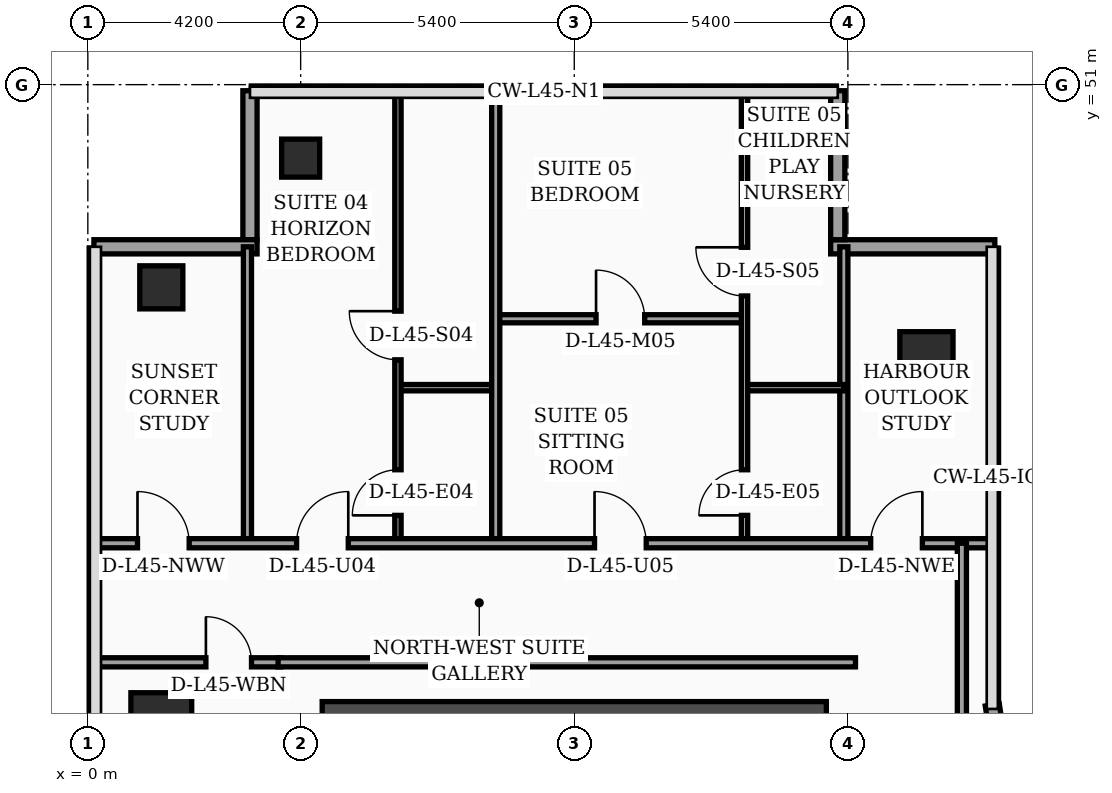
"""IFC4 building model, lengths in metres.
Left out: names, types, materials, properties, quantities, classifications, styles, units other than length and angle.
Written with IfcOpenShell. Run it as: python <this file> out.ifc"""

import sys

from ifc_helpers import new_model, si_unit, direction, frame, frame_2d, origin, origin_2d, place, context, subcontext, project, spatial, rectangle, hollow_rectangle, extrude, element, fill, save


model = new_model("IFC4")
c1 = context("Model", 3, precision=1e-05, world=origin(), true_north=direction((0.0, 1.0)))
c2 = subcontext(c1, "Body", "Model", "MODEL_VIEW")
j1 = project(units=[si_unit("LENGTHUNIT", "METRE"), si_unit("PLANEANGLEUNIT", "RADIAN")], contexts=[c1])
p1 = place(None, origin())
s1 = spatial("IfcSite", under=j1, at=p1, CompositionType="ELEMENT")
p2 = place(p1, origin())
s2 = spatial("IfcBuilding", under=s1, at=p2, CompositionType="ELEMENT")
p3 = place(p2, frame((0.0, 0.0, 182.7)))
s3 = spatial("IfcBuildingStorey", under=s2, at=p3, CompositionType="ELEMENT", Elevation=182.7)
p4 = place(p3, frame((4.625, 38.4, 0.0), z_axis=(0.0, 0.0, 1.0), x_axis=(1.0, 0.0, 0.0)))
e1 = element("IfcWall", 1, at=p4, inside=s3, PredefinedType="SHEAR", context=c2, shape_type="SweptSolid", body=[
    extrude(rectangle(XDim=9.95, YDim=0.85, at=frame_2d((4.975, 0.0))), origin(), (0.0, 0.0, 1.0), 3.52),
])
p5 = place(p3, frame((1.45, 38.4, 0.0), z_axis=(0.0, 0.0, 1.0), x_axis=(1.0, 0.0, 0.0)))
e2 = element("IfcColumn", 2, at=p5, inside=s3, PredefinedType="COLUMN", context=c2, shape_type="SweptSolid", body=[
    extrude(rectangle(XDim=1.2, YDim=1.2, at=origin_2d()), origin(), (0.0, 0.0, 1.0), 3.52),
])
p6 = place(p3, frame((1.45, 47.0, 0.0), z_axis=(0.0, 0.0, 1.0), x_axis=(1.0, 0.0, 0.0)))
e3 = element("IfcColumn", 3, at=p6, inside=s3, PredefinedType="COLUMN", context=c2, shape_type="SweptSolid", body=[
    extrude(hollow_rectangle(XDim=0.85, YDim=0.85, WallThickness=0.036, at=origin_2d()), origin(), (0.0, 0.0, 1.0), 3.52),
])
p7 = place(p3, frame((4.2, 49.55, 0.0), z_axis=(0.0, 0.0, 1.0), x_axis=(1.0, 0.0, 0.0)))
e4 = element("IfcColumn", 4, at=p7, inside=s3, PredefinedType="COLUMN", context=c2, shape_type="SweptSolid", body=[
    extrude(hollow_rectangle(XDim=0.75, YDim=0.75, WallThickness=0.032, at=origin_2d()), origin(), (0.0, 0.0, 1.0), 3.52),
])
p8 = place(p3, frame((16.55, 45.6, 0.0), z_axis=(0.0, 0.0, 1.0), x_axis=(1.0, 0.0, 0.0)))
e5 = element("IfcColumn", 5, at=p8, inside=s3, PredefinedType="COLUMN", context=c2, shape_type="SweptSolid", body=[
    extrude(rectangle(XDim=1.05, YDim=1.05, at=origin_2d()), origin(), (0.0, 0.0, 1.0), 3.52),
])
p9 = place(p3, frame((17.962, 38.03, 0.0), z_axis=(0.0, 0.0, 1.0), x_axis=(-0.15141125477, 0.988470855377, 0.0)))
e6 = element("IfcWall", 6, at=p9, inside=s3, PredefinedType="SOLIDWALL", context=c2, shape_type="SweptSolid", body=[
    extrude(rectangle(XDim=0.739, YDim=0.28, at=frame_2d((0.369, 0.0))), origin(), (0.0, 0.0, 1.0), 3.52),
])
p10 = place(p3, frame((17.9, 47.8, 0.0), z_axis=(0.0, 0.0, 1.0), x_axis=(-1.0, 0.0, 0.0)))
e7 = element("IfcWall", 7, at=p10, inside=s3, PredefinedType="SOLIDWALL", context=c2, shape_type="SweptSolid", body=[
    extrude(rectangle(XDim=3.24, YDim=0.28, at=frame_2d((1.62, 0.0))), origin(), (0.0, 0.0, 1.0), 3.52),
])
p11 = place(p3, frame((14.8, 47.94, 0.0), z_axis=(0.0, 0.0, 1.0), x_axis=(0.0, 1.0, 0.0)))
e8 = element("IfcWall", 8, at=p11, inside=s3, PredefinedType="SOLIDWALL", context=c2, shape_type="SweptSolid", body=[
    extrude(rectangle(XDim=2.94, YDim=0.28, at=frame_2d((1.47, 0.0))), origin(), (0.0, 0.0, 1.0), 3.52),
])
p12 = place(p3, frame((3.2, 50.88, 0.0), z_axis=(0.0, 0.0, 1.0), x_axis=(0.0, -1.0, 0.0)))
e9 = element("IfcWall", 9, at=p12, inside=s3, PredefinedType="SOLIDWALL", context=c2, shape_type="SweptSolid", body=[
    extrude(rectangle(XDim=2.94, YDim=0.28, at=frame_2d((1.47, 0.0))), origin(), (0.0, 0.0, 1.0), 3.02),
])
p13 = place(p3, frame((3.34, 47.8, 0.0), z_axis=(0.0, 0.0, 1.0), x_axis=(-1.0, 0.0, 0.0)))
e10 = element("IfcWall", 10, at=p13, inside=s3, PredefinedType="SOLIDWALL", context=c2, shape_type="SweptSolid", body=[
    extrude(rectangle(XDim=3.22, YDim=0.28, at=frame_2d((1.61, 0.0))), origin(), (0.0, 0.0, 1.0), 3.02),
])
p14 = place(p3, frame((0.08, 39.6, 0.0), z_axis=(0.0, 0.0, 1.0), x_axis=(1.0, 0.0, 0.0)))
e11 = element("IfcWall", 11, at=p14, inside=s3, PredefinedType="PARTITIONING", context=c2, shape_type="SweptSolid", body=[
    extrude(rectangle(XDim=3.725, YDim=0.18, at=frame_2d((1.862, 0.0))), origin(), (0.0, 0.0, 1.0), 2.92),
])
p15 = place(p14, frame((2.25, 0.0, 0.0)))
e12 = element("IfcOpeningElement", 12, at=p15, cuts=e11, PredefinedType="OPENING", context=c2, shape_type="SweptSolid", body=[
    extrude(rectangle(XDim=0.9, YDim=2.15, at=frame_2d((0.45, 1.075))), frame((0.0, 0.1, 0.0), z_axis=(0.0, -1.0, 0.0), x_axis=(1.0, 0.0, 0.0)), (0.0, 0.0, 1.0), 0.2),
])
p16 = place(p3, frame((3.15, 41.95, 0.0), z_axis=(0.0, 0.0, 1.0), x_axis=(0.0, 1.0, 0.0)))
e13 = element("IfcWall", 13, at=p16, inside=s3, PredefinedType="PARTITIONING", context=c2, shape_type="SweptSolid", body=[
    extrude(rectangle(XDim=5.85, YDim=0.16, at=frame_2d((2.925, 0.0))), origin(), (0.0, 0.0, 1.0), 3.12),
])
p17 = place(p3, frame((14.92, 41.95, 0.0), z_axis=(0.0, 0.0, 1.0), x_axis=(0.0, 1.0, 0.0)))
e14 = element("IfcWall", 14, at=p17, inside=s3, PredefinedType="PARTITIONING", context=c2, shape_type="SweptSolid", body=[
    extrude(rectangle(XDim=5.85, YDim=0.16, at=frame_2d((2.925, 0.0))), origin(), (0.0, 0.0, 1.0), 3.02),
])
p18 = place(p3, frame((6.12, 45.02, 0.0), z_axis=(0.0, 0.0, 1.0), x_axis=(1.0, 0.0, 0.0)))
e15 = element("IfcWall", 15, at=p18, inside=s3, PredefinedType="PARTITIONING", context=c2, shape_type="SweptSolid", body=[
    extrude(rectangle(XDim=1.93, YDim=0.125, at=frame_2d((0.965, 0.0))), origin(), (0.0, 0.0, 1.0), 3.52),
])
p19 = place(p3, frame((6.12, 41.95, 0.0), z_axis=(0.0, 0.0, 1.0), x_axis=(0.0, 1.0, 0.0)))
e16 = element("IfcWall", 16, at=p19, inside=s3, PredefinedType="PARTITIONING", context=c2, shape_type="SweptSolid", body=[
    extrude(rectangle(XDim=8.99, YDim=0.125, at=frame_2d((4.495, 0.0))), origin(), (0.0, 0.0, 1.0), 3.02),
])
p20 = place(p19, frame((0.55, 0.0, 0.0)))
e17 = element("IfcOpeningElement", 17, at=p20, cuts=e16, PredefinedType="OPENING", context=c2, shape_type="SweptSolid", body=[
    extrude(rectangle(XDim=0.9, YDim=2.15, at=frame_2d((0.45, 1.075))), frame((0.0, 0.073, 0.0), z_axis=(0.0, -1.0, 0.0), x_axis=(1.0, 0.0, 0.0)), (0.0, 0.0, 1.0), 0.145),
])
p21 = place(p19, frame((3.62, 0.0, 0.0)))
e18 = element("IfcOpeningElement", 18, at=p21, cuts=e16, PredefinedType="OPENING", context=c2, shape_type="SweptSolid", body=[
    extrude(rectangle(XDim=0.96, YDim=2.2, at=frame_2d((0.48, 1.1))), frame((0.0, 0.073, 0.0), z_axis=(0.0, -1.0, 0.0), x_axis=(1.0, 0.0, 0.0)), (0.0, 0.0, 1.0), 0.145),
])
p22 = place(p3, frame((12.96, 45.02, 0.0), z_axis=(0.0, 0.0, 1.0), x_axis=(1.0, 0.0, 0.0)))
e19 = element("IfcWall", 19, at=p22, inside=s3, PredefinedType="PARTITIONING", context=c2, shape_type="SweptSolid", body=[
    extrude(rectangle(XDim=1.96, YDim=0.125, at=frame_2d((0.98, 0.0))), origin(), (0.0, 0.0, 1.0), 3.52),
])
p23 = place(p3, frame((8.05, 46.38, 0.0), z_axis=(0.0, 0.0, 1.0), x_axis=(1.0, 0.0, 0.0)))
e20 = element("IfcWall", 20, at=p23, inside=s3, PredefinedType="PARTITIONING", context=c2, shape_type="SweptSolid", body=[
    extrude(rectangle(XDim=4.91, YDim=0.16, at=frame_2d((2.455, 0.0))), origin(), (0.0, 0.0, 1.0), 3.02),
])
p24 = place(p23, frame((1.98, 0.0, 0.0)))
e21 = element("IfcOpeningElement", 21, at=p24, cuts=e20, PredefinedType="OPENING", context=c2, shape_type="SweptSolid", body=[
    extrude(rectangle(XDim=0.96, YDim=2.2, at=frame_2d((0.48, 1.1))), frame((0.0, 0.09, 0.0), z_axis=(0.0, -1.0, 0.0), x_axis=(1.0, 0.0, 0.0)), (0.0, 0.0, 1.0), 0.18),
])
p25 = place(p3, frame((12.96, 41.95, 0.0), z_axis=(0.0, 0.0, 1.0), x_axis=(0.0, 1.0, 0.0)))
e22 = element("IfcWall", 22, at=p25, inside=s3, PredefinedType="PARTITIONING", context=c2, shape_type="SweptSolid", body=[
    extrude(rectangle(XDim=8.99, YDim=0.125, at=frame_2d((4.495, 0.0))), origin(), (0.0, 0.0, 1.0), 3.02),
])
p26 = place(p25, frame((0.55, 0.0, 0.0)))
e23 = element("IfcOpeningElement", 23, at=p26, cuts=e22, PredefinedType="OPENING", context=c2, shape_type="SweptSolid", body=[
    extrude(rectangle(XDim=0.9, YDim=2.15, at=frame_2d((0.45, 1.075))), frame((0.0, 0.073, 0.0), z_axis=(0.0, -1.0, 0.0), x_axis=(1.0, 0.0, 0.0)), (0.0, 0.0, 1.0), 0.145),
])
p27 = place(p25, frame((4.88, 0.0, 0.0)))
e24 = element("IfcOpeningElement", 24, at=p27, cuts=e22, PredefinedType="OPENING", context=c2, shape_type="SweptSolid", body=[
    extrude(rectangle(XDim=0.96, YDim=2.2, at=frame_2d((0.48, 1.1))), frame((0.0, 0.073, 0.0), z_axis=(0.0, -1.0, 0.0), x_axis=(1.0, 0.0, 0.0)), (0.0, 0.0, 1.0), 0.145),
])
p28 = place(p3, frame((8.05, 41.95, 0.0), z_axis=(0.0, 0.0, 1.0), x_axis=(0.0, 1.0, 0.0)))
e25 = element("IfcWall", 25, at=p28, inside=s3, PredefinedType="PARTITIONING", context=c2, shape_type="SweptSolid", body=[
    extrude(rectangle(XDim=8.99, YDim=0.16, at=frame_2d((4.495, 0.0))), origin(), (0.0, 0.0, 1.0), 3.02),
])
p29 = place(p3, frame((0.08, 41.95, 0.0), z_axis=(0.0, 0.0, 1.0), x_axis=(1.0, 0.0, 0.0)))
e26 = element("IfcWall", 26, at=p29, inside=s3, PredefinedType="PARTITIONING", context=c2, shape_type="SweptSolid", body=[
    extrude(rectangle(XDim=17.77, YDim=0.18, at=frame_2d((8.885, 0.0))), origin(), (0.0, 0.0, 1.0), 2.92),
])
p30 = place(p29, frame((0.9, 0.0, 0.0)))
e27 = element("IfcOpeningElement", 27, at=p30, cuts=e26, PredefinedType="OPENING", context=c2, shape_type="SweptSolid", body=[
    extrude(rectangle(XDim=1.02, YDim=2.2, at=frame_2d((0.51, 1.1))), frame((0.0, 0.1, 0.0), z_axis=(0.0, -1.0, 0.0), x_axis=(1.0, 0.0, 0.0)), (0.0, 0.0, 1.0), 0.2),
])
p31 = place(p29, frame((4.04, 0.0, 0.0)))
e28 = element("IfcOpeningElement", 28, at=p31, cuts=e26, PredefinedType="OPENING", context=c2, shape_type="SweptSolid", body=[
    extrude(rectangle(XDim=1.02, YDim=2.2, at=frame_2d((0.51, 1.1))), frame((0.0, 0.1, 0.0), z_axis=(0.0, -1.0, 0.0), x_axis=(1.0, 0.0, 0.0)), (0.0, 0.0, 1.0), 0.2),
])
p32 = place(p29, frame((9.92, 0.0, 0.0)))
e29 = element("IfcOpeningElement", 29, at=p32, cuts=e26, PredefinedType="OPENING", context=c2, shape_type="SweptSolid", body=[
    extrude(rectangle(XDim=1.02, YDim=2.2, at=frame_2d((0.51, 1.1))), frame((0.0, 0.1, 0.0), z_axis=(0.0, -1.0, 0.0), x_axis=(1.0, 0.0, 0.0)), (0.0, 0.0, 1.0), 0.2),
])
p33 = place(p29, frame((15.37, 0.0, 0.0)))
e30 = element("IfcOpeningElement", 30, at=p33, cuts=e26, PredefinedType="OPENING", context=c2, shape_type="SweptSolid", body=[
    extrude(rectangle(XDim=1.02, YDim=2.2, at=frame_2d((0.51, 1.1))), frame((0.0, 0.1, 0.0), z_axis=(0.0, -1.0, 0.0), x_axis=(1.0, 0.0, 0.0)), (0.0, 0.0, 1.0), 0.2),
])
p34 = place(p3, frame((17.25, 24.3, 0.0), z_axis=(0.0, 0.0, 1.0), x_axis=(0.0, 1.0, 0.0)))
e31 = element("IfcWall", 31, at=p34, inside=s3, PredefinedType="PARTITIONING", context=c2, shape_type="SweptSolid", body=[
    extrude(rectangle(XDim=17.65, YDim=0.18, at=frame_2d((8.825, 0.0))), origin(), (0.0, 0.0, 1.0), 2.92),
])
p35 = place(p3, frame((3.755, 39.6, 0.0), z_axis=(0.0, 0.0, 1.0), x_axis=(1.0, 0.0, 0.0)))
e32 = element("IfcWall", 32, at=p35, inside=s3, PredefinedType="PARTITIONING", context=c2, shape_type="SweptSolid", body=[
    extrude(rectangle(XDim=11.395, YDim=0.18, at=frame_2d((5.698, 0.0))), origin(), (0.0, 0.0, 1.0), 2.92),
])
p36 = place(p15, origin())
e33 = element("IfcDoor", 33, at=p36, inside=s3, OperationType="SINGLE_SWING_LEFT", PredefinedType="DOOR", context=c2, shape_type="SweptSolid", body=[
    extrude(rectangle(XDim=0.9, YDim=2.15, at=frame_2d((0.45, 1.075))), frame((0.0, 0.025, 0.0), z_axis=(0.0, -1.0, 0.0), x_axis=(1.0, 0.0, 0.0)), (0.0, 0.0, 1.0), 0.05),
])
fill(e12, e33)
p37 = place(p20, origin())
e34 = element("IfcDoor", 34, at=p37, inside=s3, OperationType="SINGLE_SWING_LEFT", PredefinedType="DOOR", context=c2, shape_type="SweptSolid", body=[
    extrude(rectangle(XDim=0.9, YDim=2.15, at=frame_2d((0.45, 1.075))), frame((0.0, 0.025, 0.0), z_axis=(0.0, -1.0, 0.0), x_axis=(1.0, 0.0, 0.0)), (0.0, 0.0, 1.0), 0.05),
])
fill(e17, e34)
p38 = place(p21, origin())
e35 = element("IfcDoor", 35, at=p38, inside=s3, OperationType="SINGLE_SWING_RIGHT", PredefinedType="DOOR", context=c2, shape_type="SweptSolid", body=[
    extrude(rectangle(XDim=0.96, YDim=2.2, at=frame_2d((0.48, 1.1))), frame((0.0, 0.025, 0.0), z_axis=(0.0, -1.0, 0.0), x_axis=(1.0, 0.0, 0.0)), (0.0, 0.0, 1.0), 0.05),
])
fill(e18, e35)
p39 = place(p24, origin())
e36 = element("IfcDoor", 36, at=p39, inside=s3, OperationType="SINGLE_SWING_LEFT", PredefinedType="DOOR", context=c2, shape_type="SweptSolid", body=[
    extrude(rectangle(XDim=0.96, YDim=2.2, at=frame_2d((0.48, 1.1))), frame((0.0, 0.025, 0.0), z_axis=(0.0, -1.0, 0.0), x_axis=(1.0, 0.0, 0.0)), (0.0, 0.0, 1.0), 0.05),
])
fill(e21, e36)
p40 = place(p26, origin())
e37 = element("IfcDoor", 37, at=p40, inside=s3, OperationType="SINGLE_SWING_LEFT", PredefinedType="DOOR", context=c2, shape_type="SweptSolid", body=[
    extrude(rectangle(XDim=0.9, YDim=2.15, at=frame_2d((0.45, 1.075))), frame((0.0, 0.025, 0.0), z_axis=(0.0, -1.0, 0.0), x_axis=(1.0, 0.0, 0.0)), (0.0, 0.0, 1.0), 0.05),
])
fill(e23, e37)
p41 = place(p27, origin())
e38 = element("IfcDoor", 38, at=p41, inside=s3, OperationType="SINGLE_SWING_RIGHT", PredefinedType="DOOR", context=c2, shape_type="SweptSolid", body=[
    extrude(rectangle(XDim=0.96, YDim=2.2, at=frame_2d((0.48, 1.1))), frame((0.0, 0.025, 0.0), z_axis=(0.0, -1.0, 0.0), x_axis=(1.0, 0.0, 0.0)), (0.0, 0.0, 1.0), 0.05),
])
fill(e24, e38)
p42 = place(p30, origin())
e39 = element("IfcDoor", 39, at=p42, inside=s3, OperationType="SINGLE_SWING_LEFT", PredefinedType="DOOR", context=c2, shape_type="SweptSolid", body=[
    extrude(rectangle(XDim=1.02, YDim=2.2, at=frame_2d((0.51, 1.1))), frame((0.0, 0.025, 0.0), z_axis=(0.0, -1.0, 0.0), x_axis=(1.0, 0.0, 0.0)), (0.0, 0.0, 1.0), 0.05),
])
fill(e27, e39)
p43 = place(p31, origin())
e40 = element("IfcDoor", 40, at=p43, inside=s3, OperationType="SINGLE_SWING_RIGHT", PredefinedType="DOOR", context=c2, shape_type="SweptSolid", body=[
    extrude(rectangle(XDim=1.02, YDim=2.2, at=frame_2d((0.51, 1.1))), frame((0.0, 0.025, 0.0), z_axis=(0.0, -1.0, 0.0), x_axis=(1.0, 0.0, 0.0)), (0.0, 0.0, 1.0), 0.05),
])
fill(e28, e40)
p44 = place(p32, origin())
e41 = element("IfcDoor", 41, at=p44, inside=s3, OperationType="SINGLE_SWING_LEFT", PredefinedType="DOOR", context=c2, shape_type="SweptSolid", body=[
    extrude(rectangle(XDim=1.02, YDim=2.2, at=frame_2d((0.51, 1.1))), frame((0.0, 0.025, 0.0), z_axis=(0.0, -1.0, 0.0), x_axis=(1.0, 0.0, 0.0)), (0.0, 0.0, 1.0), 0.05),
])
fill(e29, e41)
p45 = place(p33, origin())
e42 = element("IfcDoor", 42, at=p45, inside=s3, OperationType="SINGLE_SWING_RIGHT", PredefinedType="DOOR", context=c2, shape_type="SweptSolid", body=[
    extrude(rectangle(XDim=1.02, YDim=2.2, at=frame_2d((0.51, 1.1))), frame((0.0, 0.025, 0.0), z_axis=(0.0, -1.0, 0.0), x_axis=(1.0, 0.0, 0.0)), (0.0, 0.0, 1.0), 0.05),
])
fill(e30, e42)
save(model, sys.argv[1])
